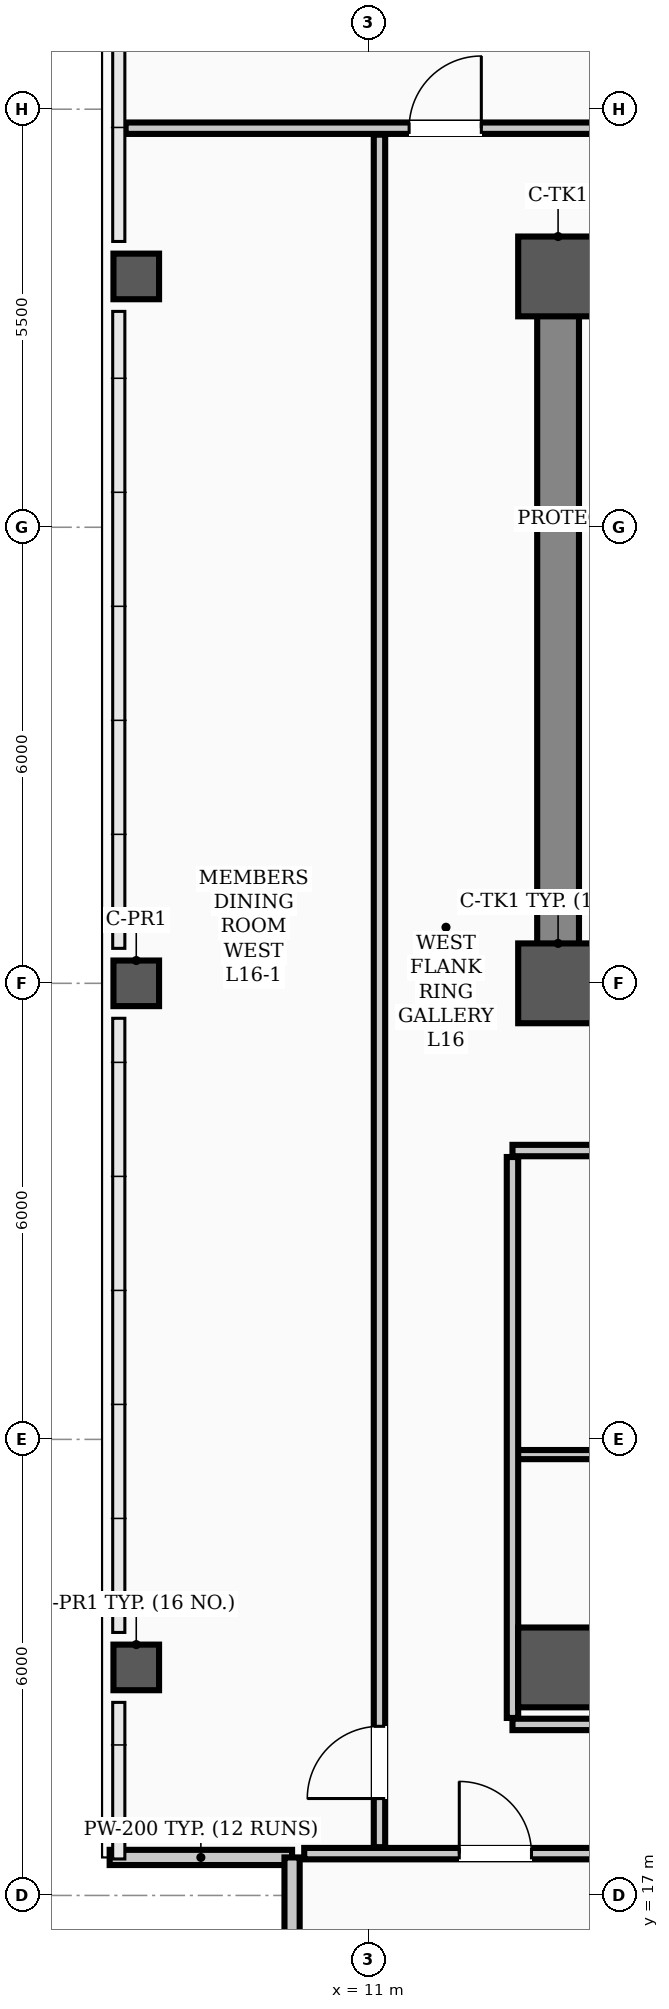
"""IFC4 building model, lengths in metres.
Left out: names, types, materials, properties, quantities, classifications, styles, units other than length and angle.
Written with IfcOpenShell. Run it as: python <this file> out.ifc"""

import sys

from ifc_helpers import new_model, si_unit, direction, frame, frame_2d, origin, origin_2d, place, context, subcontext, project, spatial, rectangle, hollow_rectangle, extrude, element, fill, save


model = new_model("IFC4")
c1 = context("Model", 3, precision=1e-05, world=origin(), true_north=direction((0.0, 1.0)))
c2 = subcontext(c1, "Body", "Model", "MODEL_VIEW")
j1 = project(units=[si_unit("LENGTHUNIT", "METRE"), si_unit("PLANEANGLEUNIT", "RADIAN")], contexts=[c1])
p1 = place(None, origin())
s1 = spatial("IfcSite", under=j1, at=p1, CompositionType="ELEMENT")
p2 = place(p1, origin())
s2 = spatial("IfcBuilding", under=s1, at=p2, CompositionType="ELEMENT")
p3 = place(p2, frame((0.0, 0.0, 65.5)))
s3 = spatial("IfcBuildingStorey", under=s2, at=p3, CompositionType="ELEMENT", Elevation=65.5)
for number, where, z_axis, x_axis in (
    (1, (13.5, 29.0, 0.0), (0.0, 0.0, 1.0), (1.0, 0.0, 0.0)),
    (2, (13.5, 38.3, 0.0), (0.0, 0.0, 1.0), (1.0, 0.0, 0.0)),
    (3, (13.5, 20.0, 0.0), (0.0, 0.0, 1.0), (1.0, 0.0, 0.0)),
):
    element("IfcColumn", number, at=place(p3, frame(where, z_axis=z_axis, x_axis=x_axis)), inside=s3, PredefinedType="COLUMN", context=c2, shape_type="SweptSolid", body=[
        extrude(hollow_rectangle(XDim=1.05, YDim=1.05, WallThickness=0.038, InnerFilletRadius=0.019, OuterFilletRadius=0.057, at=origin_2d()), origin(), (0.0, 0.0, 1.0), 3.9),
    ])
for number, where, z_axis, x_axis in (
    (4, (7.95, 20.0, 0.0), (0.0, 0.0, 1.0), (1.0, 0.0, 0.0)),
    (5, (7.95, 29.0, 0.0), (0.0, 0.0, 1.0), (1.0, 0.0, 0.0)),
    (6, (7.95, 38.3, 0.0), (0.0, 0.0, 1.0), (1.0, 0.0, 0.0)),
):
    element("IfcColumn", number, at=place(p3, frame(where, z_axis=z_axis, x_axis=x_axis)), inside=s3, PredefinedType="COLUMN", context=c2, shape_type="SweptSolid", body=[
        extrude(hollow_rectangle(XDim=0.6, YDim=0.6, WallThickness=0.026, InnerFilletRadius=0.013, OuterFilletRadius=0.039, at=origin_2d()), origin(), (0.0, 0.0, 1.0), 3.9),
    ])
for number, where, z_axis, x_axis in (
    (7, (7.6, 17.5, 0.0), (0.0, 0.0, 1.0), (1.0, 0.0, 0.0)),
    (8, (10.0, 17.5, 0.0), (0.0, 0.0, 1.0), (0.0, -1.0, 0.0)),
):
    element("IfcWall", number, at=place(p3, frame(where, z_axis=z_axis, x_axis=x_axis)), inside=s3, PredefinedType="PARAPET", context=c2, shape_type="SweptSolid", body=[
        extrude(rectangle(XDim=2.4, YDim=0.2, at=frame_2d((1.2, 0.0))), origin(), (0.0, 0.0, 1.0), 1.2),
    ])
p4 = place(p3, frame((13.5, 29.0, 0.0), z_axis=(0.0, 0.0, 1.0), x_axis=(1.0, 0.0, 0.0)))
e9 = element("IfcWall", 9, at=p4, inside=s3, PredefinedType="SHEAR", context=c2, shape_type="SweptSolid", body=[
    extrude(rectangle(XDim=30.5, YDim=0.55, at=frame_2d((15.25, 0.0))), origin(), (0.0, 0.0, 1.0), 3.72),
])
p5 = place(p4, frame((1.75, 0.0, 0.0)))
e10 = element("IfcOpeningElement", 10, at=p5, cuts=e9, PredefinedType="OPENING", context=c2, shape_type="SweptSolid", body=[
    extrude(rectangle(XDim=1.1, YDim=2.08, at=frame_2d((0.55, 1.04))), frame((0.0, 0.285, 0.0), z_axis=(0.0, -1.0, 0.0), x_axis=(1.0, 0.0, 0.0)), (0.0, 0.0, 1.0), 0.57),
])
p6 = place(p4, frame((26.7, 0.0, 0.0)))
e11 = element("IfcOpeningElement", 11, at=p6, cuts=e9, PredefinedType="OPENING", context=c2, shape_type="SweptSolid", body=[
    extrude(rectangle(XDim=1.1, YDim=2.08, at=frame_2d((0.55, 1.04))), frame((0.0, 0.285, 0.0), z_axis=(0.0, -1.0, 0.0), x_axis=(1.0, 0.0, 0.0)), (0.0, 0.0, 1.0), 0.57),
])
p7 = place(p4, frame((6.8, 0.0, 0.0)))
e12 = element("IfcOpeningElement", 12, at=p7, cuts=e9, PredefinedType="OPENING", context=c2, shape_type="SweptSolid", body=[
    extrude(rectangle(XDim=1.1, YDim=2.08, at=frame_2d((0.55, 1.04))), frame((0.0, 0.285, 0.0), z_axis=(0.0, -1.0, 0.0), x_axis=(1.0, 0.0, 0.0)), (0.0, 0.0, 1.0), 0.57),
])
p8 = place(p4, frame((13.2, 0.0, 0.0)))
e13 = element("IfcOpeningElement", 13, at=p8, cuts=e9, PredefinedType="OPENING", context=c2, shape_type="SweptSolid", body=[
    extrude(rectangle(XDim=1.6, YDim=2.08, at=frame_2d((0.8, 1.04))), frame((0.0, 0.285, 0.0), z_axis=(0.0, -1.0, 0.0), x_axis=(1.0, 0.0, 0.0)), (0.0, 0.0, 1.0), 0.57),
])
p9 = place(p4, frame((19.53, 0.0, 0.0)))
e14 = element("IfcOpeningElement", 14, at=p9, cuts=e9, PredefinedType="OPENING", context=c2, shape_type="SweptSolid", body=[
    extrude(rectangle(XDim=0.9, YDim=2.08, at=frame_2d((0.45, 1.04))), frame((0.0, 0.285, 0.0), z_axis=(0.0, -1.0, 0.0), x_axis=(1.0, 0.0, 0.0)), (0.0, 0.0, 1.0), 0.57),
])
p10 = place(p4, frame((21.57, 0.0, 0.0)))
e15 = element("IfcOpeningElement", 15, at=p10, cuts=e9, PredefinedType="OPENING", context=c2, shape_type="SweptSolid", body=[
    extrude(rectangle(XDim=0.9, YDim=2.08, at=frame_2d((0.45, 1.04))), frame((0.0, 0.285, 0.0), z_axis=(0.0, -1.0, 0.0), x_axis=(1.0, 0.0, 0.0)), (0.0, 0.0, 1.0), 0.57),
])
p11 = place(p3, frame((13.5, 38.3, 0.0), z_axis=(0.0, 0.0, 1.0), x_axis=(1.0, 0.0, 0.0)))
e16 = element("IfcWall", 16, at=p11, inside=s3, PredefinedType="SHEAR", context=c2, shape_type="SweptSolid", body=[
    extrude(rectangle(XDim=30.5, YDim=0.55, at=frame_2d((15.25, 0.0))), origin(), (0.0, 0.0, 1.0), 3.72),
])
p12 = place(p3, frame((13.5, 29.35, 0.0), z_axis=(0.0, 0.0, 1.0), x_axis=(0.0, 1.0, 0.0)))
e17 = element("IfcWall", 17, at=p12, inside=s3, PredefinedType="SHEAR", context=c2, shape_type="SweptSolid", body=[
    extrude(rectangle(XDim=8.6, YDim=0.55, at=frame_2d((4.3, 0.0))), origin(), (0.0, 0.0, 1.0), 3.72),
])
p13 = place(p3, frame((12.9, 26.8, 0.0), z_axis=(0.0, 0.0, 1.0), x_axis=(1.0, 0.0, 0.0)))
e18 = element("IfcWall", 18, at=p13, inside=s3, PredefinedType="PARTITIONING", context=c2, shape_type="SweptSolid", body=[
    extrude(rectangle(XDim=31.7, YDim=0.15, at=frame_2d((15.85, 0.0))), origin(), (0.0, 0.0, 1.0), 3.1),
])
p14 = place(p13, frame((13.6, 0.0, 0.0)))
e19 = element("IfcOpeningElement", 19, at=p14, cuts=e18, PredefinedType="OPENING", context=c2, shape_type="SweptSolid", body=[
    extrude(rectangle(XDim=1.6, YDim=2.08, at=frame_2d((0.8, 1.04))), frame((0.0, 0.085, 0.0), z_axis=(0.0, -1.0, 0.0), x_axis=(1.0, 0.0, 0.0)), (0.0, 0.0, 1.0), 0.17),
])
p15 = place(p13, frame((2.475, 0.0, 0.0)))
e20 = element("IfcOpeningElement", 20, at=p15, cuts=e18, PredefinedType="OPENING", context=c2, shape_type="SweptSolid", body=[
    extrude(rectangle(XDim=0.95, YDim=2.08, at=frame_2d((0.475, 1.04))), frame((0.0, 0.085, 0.0), z_axis=(0.0, -1.0, 0.0), x_axis=(1.0, 0.0, 0.0)), (0.0, 0.0, 1.0), 0.17),
])
p16 = place(p13, frame((9.125, 0.0, 0.0)))
e21 = element("IfcOpeningElement", 21, at=p16, cuts=e18, PredefinedType="OPENING", context=c2, shape_type="SweptSolid", body=[
    extrude(rectangle(XDim=0.95, YDim=2.08, at=frame_2d((0.475, 1.04))), frame((0.0, 0.085, 0.0), z_axis=(0.0, -1.0, 0.0), x_axis=(1.0, 0.0, 0.0)), (0.0, 0.0, 1.0), 0.17),
])
p17 = place(p13, frame((19.125, 0.0, 0.0)))
e22 = element("IfcOpeningElement", 22, at=p17, cuts=e18, PredefinedType="OPENING", context=c2, shape_type="SweptSolid", body=[
    extrude(rectangle(XDim=0.95, YDim=2.08, at=frame_2d((0.475, 1.04))), frame((0.0, 0.085, 0.0), z_axis=(0.0, -1.0, 0.0), x_axis=(1.0, 0.0, 0.0)), (0.0, 0.0, 1.0), 0.17),
])
p18 = place(p13, frame((26.325, 0.0, 0.0)))
e23 = element("IfcOpeningElement", 23, at=p18, cuts=e18, PredefinedType="OPENING", context=c2, shape_type="SweptSolid", body=[
    extrude(rectangle(XDim=0.95, YDim=2.08, at=frame_2d((0.475, 1.04))), frame((0.0, 0.085, 0.0), z_axis=(0.0, -1.0, 0.0), x_axis=(1.0, 0.0, 0.0)), (0.0, 0.0, 1.0), 0.17),
])
p19 = place(p3, frame((10.16, 17.55, 0.0), z_axis=(0.0, 0.0, 1.0), x_axis=(1.0, 0.0, 0.0)))
e24 = element("IfcWall", 24, at=p19, inside=s3, PredefinedType="PARTITIONING", context=c2, shape_type="SweptSolid", body=[
    extrude(rectangle(XDim=44.68, YDim=0.15, at=frame_2d((22.34, 0.0))), origin(), (0.0, 0.0, 1.0), 3.1),
])
p20 = place(p19, frame((2.04, 0.0, 0.0)))
e25 = element("IfcOpeningElement", 25, at=p20, cuts=e24, PredefinedType="OPENING", context=c2, shape_type="SweptSolid", body=[
    extrude(rectangle(XDim=0.95, YDim=2.08, at=frame_2d((0.475, 1.04))), frame((0.0, 0.085, 0.0), z_axis=(0.0, -1.0, 0.0), x_axis=(1.0, 0.0, 0.0)), (0.0, 0.0, 1.0), 0.17),
])
p21 = place(p19, frame((6.565, 0.0, 0.0)))
e26 = element("IfcOpeningElement", 26, at=p21, cuts=e24, PredefinedType="OPENING", context=c2, shape_type="SweptSolid", body=[
    extrude(rectangle(XDim=0.95, YDim=2.08, at=frame_2d((0.475, 1.04))), frame((0.0, 0.085, 0.0), z_axis=(0.0, -1.0, 0.0), x_axis=(1.0, 0.0, 0.0)), (0.0, 0.0, 1.0), 0.17),
])
p22 = place(p19, frame((11.865, 0.0, 0.0)))
e27 = element("IfcOpeningElement", 27, at=p22, cuts=e24, PredefinedType="OPENING", context=c2, shape_type="SweptSolid", body=[
    extrude(rectangle(XDim=0.95, YDim=2.08, at=frame_2d((0.475, 1.04))), frame((0.0, 0.085, 0.0), z_axis=(0.0, -1.0, 0.0), x_axis=(1.0, 0.0, 0.0)), (0.0, 0.0, 1.0), 0.17),
])
p23 = place(p19, frame((24.665, 0.0, 0.0)))
e28 = element("IfcOpeningElement", 28, at=p23, cuts=e24, PredefinedType="OPENING", context=c2, shape_type="SweptSolid", body=[
    extrude(rectangle(XDim=0.95, YDim=2.08, at=frame_2d((0.475, 1.04))), frame((0.0, 0.085, 0.0), z_axis=(0.0, -1.0, 0.0), x_axis=(1.0, 0.0, 0.0)), (0.0, 0.0, 1.0), 0.17),
])
p24 = place(p19, frame((31.765, 0.0, 0.0)))
e29 = element("IfcOpeningElement", 29, at=p24, cuts=e24, PredefinedType="OPENING", context=c2, shape_type="SweptSolid", body=[
    extrude(rectangle(XDim=0.95, YDim=2.08, at=frame_2d((0.475, 1.04))), frame((0.0, 0.085, 0.0), z_axis=(0.0, -1.0, 0.0), x_axis=(1.0, 0.0, 0.0)), (0.0, 0.0, 1.0), 0.17),
])
p25 = place(p3, frame((12.9, 19.25, 0.0), z_axis=(0.0, 0.0, 1.0), x_axis=(1.0, 0.0, 0.0)))
e30 = element("IfcWall", 30, at=p25, inside=s3, PredefinedType="PARTITIONING", context=c2, shape_type="SweptSolid", body=[
    extrude(rectangle(XDim=13.3, YDim=0.15, at=frame_2d((6.65, 0.0))), origin(), (0.0, 0.0, 1.0), 3.1),
])
p26 = place(p25, frame((2.475, 0.0, 0.0)))
e31 = element("IfcOpeningElement", 31, at=p26, cuts=e30, PredefinedType="OPENING", context=c2, shape_type="SweptSolid", body=[
    extrude(rectangle(XDim=0.95, YDim=2.08, at=frame_2d((0.475, 1.04))), frame((0.0, 0.085, 0.0), z_axis=(0.0, -1.0, 0.0), x_axis=(1.0, 0.0, 0.0)), (0.0, 0.0, 1.0), 0.17),
])
p27 = place(p25, frame((9.125, 0.0, 0.0)))
e32 = element("IfcOpeningElement", 32, at=p27, cuts=e30, PredefinedType="OPENING", context=c2, shape_type="SweptSolid", body=[
    extrude(rectangle(XDim=0.95, YDim=2.08, at=frame_2d((0.475, 1.04))), frame((0.0, 0.085, 0.0), z_axis=(0.0, -1.0, 0.0), x_axis=(1.0, 0.0, 0.0)), (0.0, 0.0, 1.0), 0.17),
])
p28 = place(p3, frame((12.9, 22.8, 0.0), z_axis=(0.0, 0.0, 1.0), x_axis=(1.0, 0.0, 0.0)))
e33 = element("IfcWall", 33, at=p28, inside=s3, PredefinedType="PARTITIONING", context=c2, shape_type="SweptSolid", body=[
    extrude(rectangle(XDim=5.9, YDim=0.12, at=frame_2d((2.95, 0.0))), origin(), (0.0, 0.0, 1.0), 3.1),
])
p29 = place(p3, frame((7.81, 40.25, 0.0), z_axis=(0.0, 0.0, 1.0), x_axis=(1.0, 0.0, 0.0)))
e34 = element("IfcWall", 34, at=p29, inside=s3, PredefinedType="PARTITIONING", context=c2, shape_type="SweptSolid", body=[
    extrude(rectangle(XDim=49.38, YDim=0.15, at=frame_2d((24.69, 0.0))), origin(), (0.0, 0.0, 1.0), 3.1),
])
p30 = place(p29, frame((3.73, 0.0, 0.0)))
e35 = element("IfcOpeningElement", 35, at=p30, cuts=e34, PredefinedType="OPENING", context=c2, shape_type="SweptSolid", body=[
    extrude(rectangle(XDim=0.95, YDim=2.08, at=frame_2d((0.475, 1.04))), frame((0.0, 0.085, 0.0), z_axis=(0.0, -1.0, 0.0), x_axis=(1.0, 0.0, 0.0)), (0.0, 0.0, 1.0), 0.17),
])
p31 = place(p29, frame((11.015, 0.0, 0.0)))
e36 = element("IfcOpeningElement", 36, at=p31, cuts=e34, PredefinedType="OPENING", context=c2, shape_type="SweptSolid", body=[
    extrude(rectangle(XDim=0.95, YDim=2.08, at=frame_2d((0.475, 1.04))), frame((0.0, 0.085, 0.0), z_axis=(0.0, -1.0, 0.0), x_axis=(1.0, 0.0, 0.0)), (0.0, 0.0, 1.0), 0.17),
])
p32 = place(p29, frame((18.215, 0.0, 0.0)))
e37 = element("IfcOpeningElement", 37, at=p32, cuts=e34, PredefinedType="OPENING", context=c2, shape_type="SweptSolid", body=[
    extrude(rectangle(XDim=0.95, YDim=2.08, at=frame_2d((0.475, 1.04))), frame((0.0, 0.085, 0.0), z_axis=(0.0, -1.0, 0.0), x_axis=(1.0, 0.0, 0.0)), (0.0, 0.0, 1.0), 0.17),
])
p33 = place(p29, frame((25.515, 0.0, 0.0)))
e38 = element("IfcOpeningElement", 38, at=p33, cuts=e34, PredefinedType="OPENING", context=c2, shape_type="SweptSolid", body=[
    extrude(rectangle(XDim=0.95, YDim=2.08, at=frame_2d((0.475, 1.04))), frame((0.0, 0.085, 0.0), z_axis=(0.0, -1.0, 0.0), x_axis=(1.0, 0.0, 0.0)), (0.0, 0.0, 1.0), 0.17),
])
p34 = place(p29, frame((31.915, 0.0, 0.0)))
e39 = element("IfcOpeningElement", 39, at=p34, cuts=e34, PredefinedType="OPENING", context=c2, shape_type="SweptSolid", body=[
    extrude(rectangle(XDim=0.95, YDim=2.08, at=frame_2d((0.475, 1.04))), frame((0.0, 0.085, 0.0), z_axis=(0.0, -1.0, 0.0), x_axis=(1.0, 0.0, 0.0)), (0.0, 0.0, 1.0), 0.17),
])
p35 = place(p29, frame((37.2, 0.0, 0.0)))
e40 = element("IfcOpeningElement", 40, at=p35, cuts=e34, PredefinedType="OPENING", context=c2, shape_type="SweptSolid", body=[
    extrude(rectangle(XDim=0.95, YDim=2.08, at=frame_2d((0.475, 1.04))), frame((0.0, 0.085, 0.0), z_axis=(0.0, -1.0, 0.0), x_axis=(1.0, 0.0, 0.0)), (0.0, 0.0, 1.0), 0.17),
])
p36 = place(p3, frame((11.15, 17.635, 0.0), z_axis=(0.0, 0.0, 1.0), x_axis=(0.0, 1.0, 0.0)))
e41 = element("IfcWall", 41, at=p36, inside=s3, PredefinedType="PARTITIONING", context=c2, shape_type="SweptSolid", body=[
    extrude(rectangle(XDim=22.53, YDim=0.15, at=frame_2d((11.265, 0.0))), origin(), (0.0, 0.0, 1.0), 3.0),
])
p37 = place(p36, frame((0.64, 0.0, 0.0)))
e42 = element("IfcOpeningElement", 42, at=p37, cuts=e41, PredefinedType="OPENING", context=c2, shape_type="SweptSolid", body=[
    extrude(rectangle(XDim=0.95, YDim=2.08, at=frame_2d((0.475, 1.04))), frame((0.0, 0.085, 0.0), z_axis=(0.0, -1.0, 0.0), x_axis=(1.0, 0.0, 0.0)), (0.0, 0.0, 1.0), 0.17),
])
p38 = place(p3, frame((12.9, 19.335, 0.0), z_axis=(0.0, 0.0, 1.0), x_axis=(0.0, 1.0, 0.0)))
e43 = element("IfcWall", 43, at=p38, inside=s3, PredefinedType="PARTITIONING", context=c2, shape_type="SweptSolid", body=[
    extrude(rectangle(XDim=7.38, YDim=0.15, at=frame_2d((3.69, 0.0))), origin(), (0.0, 0.0, 1.0), 3.0),
])
p39 = place(p20, origin())
e44 = element("IfcDoor", 44, at=p39, inside=s3, OperationType="SINGLE_SWING_LEFT", PredefinedType="DOOR", context=c2, shape_type="SweptSolid", body=[
    extrude(rectangle(XDim=0.95, YDim=2.08, at=frame_2d((0.475, 1.04))), frame((0.0, 0.025, 0.0), z_axis=(0.0, -1.0, 0.0), x_axis=(1.0, 0.0, 0.0)), (0.0, 0.0, 1.0), 0.05),
])
fill(e25, e44)
p40 = place(p37, origin())
e45 = element("IfcDoor", 45, at=p40, inside=s3, OperationType="SINGLE_SWING_LEFT", PredefinedType="DOOR", context=c2, shape_type="SweptSolid", body=[
    extrude(rectangle(XDim=0.95, YDim=2.08, at=frame_2d((0.475, 1.04))), frame((0.0, 0.025, 0.0), z_axis=(0.0, -1.0, 0.0), x_axis=(1.0, 0.0, 0.0)), (0.0, 0.0, 1.0), 0.05),
])
fill(e42, e45)
p41 = place(p30, origin())
e46 = element("IfcDoor", 46, at=p41, inside=s3, OperationType="SINGLE_SWING_RIGHT", PredefinedType="DOOR", context=c2, shape_type="SweptSolid", body=[
    extrude(rectangle(XDim=0.95, YDim=2.08, at=frame_2d((0.475, 1.04))), frame((0.0, 0.025, 0.0), z_axis=(0.0, -1.0, 0.0), x_axis=(1.0, 0.0, 0.0)), (0.0, 0.0, 1.0), 0.05),
])
fill(e35, e46)
save(model, sys.argv[1])
